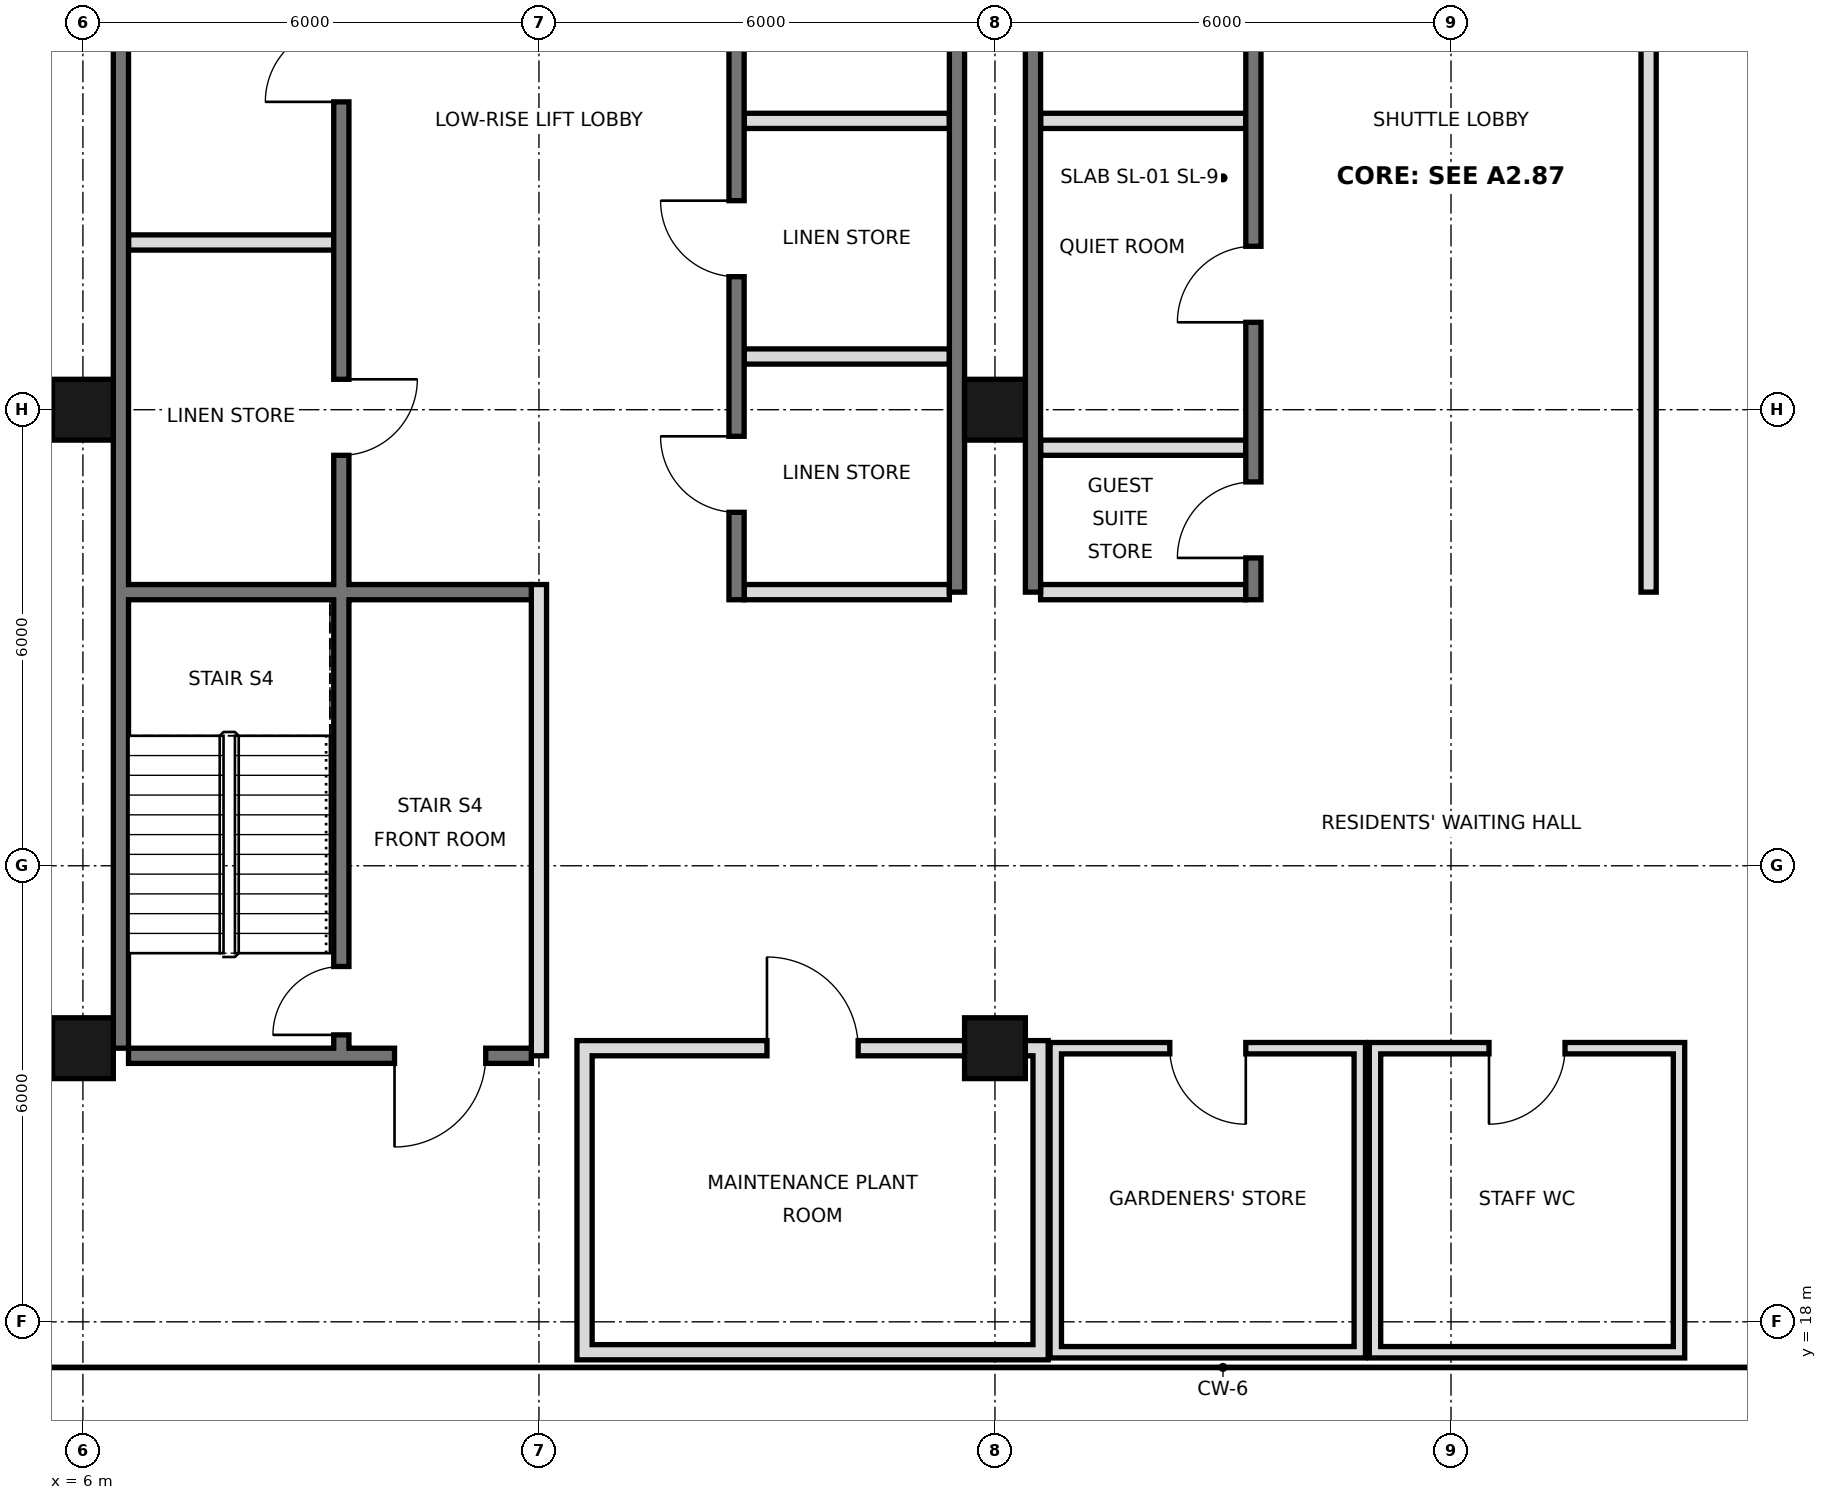
"""IFC4 building model, lengths in metres.
Left out: names, types, materials, properties, quantities, classifications, styles, units other than length and angle.
Written with IfcOpenShell. Run it as: python <this file> out.ifc"""

import sys

from ifc_helpers import new_model, si_unit, direction, frame, frame_2d, origin, origin_2d, place, context, subcontext, project, spatial, rectangle, hollow_rectangle, extrude, element, fill, save


model = new_model("IFC4")
c1 = context("Model", 3, precision=1e-05, world=origin(), true_north=direction((0.0, 1.0)))
c2 = subcontext(c1, "Body", "Model", "MODEL_VIEW")
j1 = project(units=[si_unit("LENGTHUNIT", "METRE"), si_unit("PLANEANGLEUNIT", "RADIAN")], contexts=[c1])
p1 = place(None, origin())
s1 = spatial("IfcSite", under=j1, at=p1, CompositionType="ELEMENT")
p2 = place(p1, origin())
s2 = spatial("IfcBuilding", under=s1, at=p2, CompositionType="ELEMENT")
p3 = place(p2, frame((0.0, 0.0, 349.8)))
s3 = spatial("IfcBuildingStorey", under=s2, at=p3, CompositionType="ELEMENT", Elevation=349.8)
for number, where, z_axis, x_axis in (
    (1, (6.0, 21.6, 0.0), (0.0, 0.0, 1.0), (1.0, 0.0, 0.0)),
    (2, (6.0, 30.0, 0.0), (0.0, 0.0, 1.0), (1.0, 0.0, 0.0)),
    (3, (18.0, 21.6, 0.0), (0.0, 0.0, 1.0), (1.0, 0.0, 0.0)),
    (4, (18.0, 30.0, 0.0), (0.0, 0.0, 1.0), (1.0, 0.0, 0.0)),
):
    element("IfcColumn", number, at=place(p3, frame(where, z_axis=z_axis, x_axis=x_axis)), inside=s3, PredefinedType="COLUMN", context=c2, shape_type="SweptSolid", body=[
        extrude(hollow_rectangle(XDim=0.8, YDim=0.8, WallThickness=0.025, at=origin_2d()), origin(), (0.0, 0.0, 1.0), 4.0),
    ])
p4 = place(p3, frame((12.6, 17.5, 0.0), z_axis=(0.0, 0.0, 1.0), x_axis=(0.0, 1.0, 0.0)))
e5 = element("IfcWall", 5, at=p4, inside=s3, PredefinedType="SOLIDWALL", context=c2, shape_type="SweptSolid", body=[
    extrude(rectangle(XDim=4.2, YDim=0.2, at=frame_2d((2.1, 0.0))), origin(), (0.0, 0.0, 1.0), 3.75),
])
p5 = place(p3, frame((18.6, 17.5, 0.0), z_axis=(0.0, 0.0, 1.0), x_axis=(0.0, 1.0, 0.0)))
e6 = element("IfcWall", 6, at=p5, inside=s3, PredefinedType="SOLIDWALL", context=c2, shape_type="SweptSolid", body=[
    extrude(rectangle(XDim=4.2, YDim=0.2, at=frame_2d((2.1, 0.0))), origin(), (0.0, 0.0, 1.0), 3.05),
])
for number, where, z_axis, x_axis in (
    (7, (18.8, 17.525, 0.0), (0.0, 0.0, 1.0), (0.0, 1.0, 0.0)),
    (8, (22.8, 17.525, 0.0), (0.0, 0.0, 1.0), (0.0, 1.0, 0.0)),
    (9, (23.0, 17.525, 0.0), (0.0, 0.0, 1.0), (0.0, 1.0, 0.0)),
    (10, (27.0, 17.525, 0.0), (0.0, 0.0, 1.0), (0.0, 1.0, 0.0)),
):
    element("IfcWall", number, at=place(p3, frame(where, z_axis=z_axis, x_axis=x_axis)), inside=s3, PredefinedType="PARTITIONING", context=c2, shape_type="SweptSolid", body=[
        extrude(rectangle(XDim=4.15, YDim=0.15, at=frame_2d((2.075, 0.0))), origin(), (0.0, 0.0, 1.0), 3.75),
    ])
p6 = place(p3, frame((12.7, 17.6, 0.0), z_axis=(0.0, 0.0, 1.0), x_axis=(1.0, 0.0, 0.0)))
e11 = element("IfcWall", 11, at=p6, inside=s3, PredefinedType="SOLIDWALL", context=c2, shape_type="SweptSolid", body=[
    extrude(rectangle(XDim=5.8, YDim=0.2, at=frame_2d((2.9, 0.0))), origin(), (0.0, 0.0, 1.0), 3.75),
])
for number, where, z_axis, x_axis in (
    (12, (18.875, 17.6, 0.0), (0.0, 0.0, 1.0), (1.0, 0.0, 0.0)),
    (13, (23.075, 17.6, 0.0), (0.0, 0.0, 1.0), (1.0, 0.0, 0.0)),
):
    element("IfcWall", number, at=place(p3, frame(where, z_axis=z_axis, x_axis=x_axis)), inside=s3, PredefinedType="PARTITIONING", context=c2, shape_type="SweptSolid", body=[
        extrude(rectangle(XDim=3.85, YDim=0.15, at=frame_2d((1.925, 0.0))), origin(), (0.0, 0.0, 1.0), 3.75),
    ])
p7 = place(p3, frame((12.7, 21.6, 0.0), z_axis=(0.0, 0.0, 1.0), x_axis=(1.0, 0.0, 0.0)))
e14 = element("IfcWall", 14, at=p7, inside=s3, PredefinedType="SOLIDWALL", context=c2, shape_type="SweptSolid", body=[
    extrude(rectangle(XDim=5.8, YDim=0.2, at=frame_2d((2.9, 0.0))), origin(), (0.0, 0.0, 1.0), 3.75),
])
p8 = place(p7, frame((2.3, 0.0, 0.0)))
e15 = element("IfcOpeningElement", 15, at=p8, cuts=e14, PredefinedType="OPENING", context=c2, shape_type="SweptSolid", body=[
    extrude(rectangle(XDim=1.2, YDim=2.4, at=frame_2d((0.6, 1.2))), frame((0.0, 0.11, 0.0), z_axis=(0.0, -1.0, 0.0), x_axis=(1.0, 0.0, 0.0)), (0.0, 0.0, 1.0), 0.22),
])
p9 = place(p3, frame((18.875, 21.6, 0.0), z_axis=(0.0, 0.0, 1.0), x_axis=(1.0, 0.0, 0.0)))
e16 = element("IfcWall", 16, at=p9, inside=s3, PredefinedType="PARTITIONING", context=c2, shape_type="SweptSolid", body=[
    extrude(rectangle(XDim=3.85, YDim=0.15, at=frame_2d((1.925, 0.0))), origin(), (0.0, 0.0, 1.0), 3.75),
])
p10 = place(p9, frame((1.425, 0.0, 0.0)))
e17 = element("IfcOpeningElement", 17, at=p10, cuts=e16, PredefinedType="OPENING", context=c2, shape_type="SweptSolid", body=[
    extrude(rectangle(XDim=1.0, YDim=2.4, at=frame_2d((0.5, 1.2))), frame((0.0, 0.085, 0.0), z_axis=(0.0, -1.0, 0.0), x_axis=(1.0, 0.0, 0.0)), (0.0, 0.0, 1.0), 0.17),
])
p11 = place(p3, frame((23.075, 21.6, 0.0), z_axis=(0.0, 0.0, 1.0), x_axis=(1.0, 0.0, 0.0)))
e18 = element("IfcWall", 18, at=p11, inside=s3, PredefinedType="PARTITIONING", context=c2, shape_type="SweptSolid", body=[
    extrude(rectangle(XDim=3.85, YDim=0.15, at=frame_2d((1.925, 0.0))), origin(), (0.0, 0.0, 1.0), 3.75),
])
p12 = place(p11, frame((1.425, 0.0, 0.0)))
e19 = element("IfcOpeningElement", 19, at=p12, cuts=e18, PredefinedType="OPENING", context=c2, shape_type="SweptSolid", body=[
    extrude(rectangle(XDim=1.0, YDim=2.4, at=frame_2d((0.5, 1.2))), frame((0.0, 0.085, 0.0), z_axis=(0.0, -1.0, 0.0), x_axis=(1.0, 0.0, 0.0)), (0.0, 0.0, 1.0), 0.17),
])
p13 = place(p3, frame((6.5, 21.6, 0.0), z_axis=(0.0, 0.0, 1.0), x_axis=(0.0, 1.0, 0.0)))
e20 = element("IfcWall", 20, at=p13, inside=s3, PredefinedType="SOLIDWALL", context=c2, shape_type="SweptSolid", body=[
    extrude(rectangle(XDim=23.5, YDim=0.2, at=frame_2d((11.75, 0.0))), origin(), (0.0, 0.0, 1.0), 3.75),
])
for number, where, z_axis, x_axis in (
    (21, (17.5, 27.6, 0.0), (0.0, 0.0, 1.0), (0.0, 1.0, 0.0)),
    (22, (18.5, 27.6, 0.0), (0.0, 0.0, 1.0), (0.0, 1.0, 0.0)),
):
    element("IfcWall", number, at=place(p3, frame(where, z_axis=z_axis, x_axis=x_axis)), inside=s3, PredefinedType="SOLIDWALL", context=c2, shape_type="SweptSolid", body=[
        extrude(rectangle(XDim=17.5, YDim=0.2, at=frame_2d((8.75, 0.0))), origin(), (0.0, 0.0, 1.0), 3.75),
    ])
p14 = place(p3, frame((12.0, 21.5, 0.0), z_axis=(0.0, 0.0, 1.0), x_axis=(0.0, 1.0, 0.0)))
e23 = element("IfcWall", 23, at=p14, inside=s3, PredefinedType="PARTITIONING", context=c2, shape_type="SweptSolid", body=[
    extrude(rectangle(XDim=6.2, YDim=0.2, at=frame_2d((3.1, 0.0))), origin(), (0.0, 0.0, 1.0), 3.75),
])
p15 = place(p3, frame((14.6, 27.5, 0.0), z_axis=(0.0, 0.0, 1.0), x_axis=(0.0, 1.0, 0.0)))
e24 = element("IfcWall", 24, at=p15, inside=s3, PredefinedType="SOLIDWALL", context=c2, shape_type="SweptSolid", body=[
    extrude(rectangle(XDim=17.5, YDim=0.2, at=frame_2d((8.75, 0.0))), origin(), (0.0, 0.0, 1.0), 3.75),
])
p16 = place(p15, frame((15.4, 0.0, 0.0)))
e25 = element("IfcOpeningElement", 25, at=p16, cuts=e24, PredefinedType="OPENING", context=c2, shape_type="SweptSolid", body=[
    extrude(rectangle(XDim=1.1, YDim=2.1, at=frame_2d((0.55, 1.05))), frame((0.0, 0.11, 0.0), z_axis=(0.0, -1.0, 0.0), x_axis=(1.0, 0.0, 0.0)), (0.0, 0.0, 1.0), 0.22),
])
p17 = place(p15, frame((1.15, 0.0, 0.0)))
e26 = element("IfcOpeningElement", 26, at=p17, cuts=e24, PredefinedType="OPENING", context=c2, shape_type="SweptSolid", body=[
    extrude(rectangle(XDim=1.0, YDim=2.1, at=frame_2d((0.5, 1.05))), frame((0.0, 0.11, 0.0), z_axis=(0.0, -1.0, 0.0), x_axis=(1.0, 0.0, 0.0)), (0.0, 0.0, 1.0), 0.22),
])
p18 = place(p15, frame((4.25, 0.0, 0.0)))
e27 = element("IfcOpeningElement", 27, at=p18, cuts=e24, PredefinedType="OPENING", context=c2, shape_type="SweptSolid", body=[
    extrude(rectangle(XDim=1.0, YDim=2.1, at=frame_2d((0.5, 1.05))), frame((0.0, 0.11, 0.0), z_axis=(0.0, -1.0, 0.0), x_axis=(1.0, 0.0, 0.0)), (0.0, 0.0, 1.0), 0.22),
])
p19 = place(p3, frame((21.4, 27.5, 0.0), z_axis=(0.0, 0.0, 1.0), x_axis=(0.0, 1.0, 0.0)))
e28 = element("IfcWall", 28, at=p19, inside=s3, PredefinedType="SOLIDWALL", context=c2, shape_type="SweptSolid", body=[
    extrude(rectangle(XDim=17.5, YDim=0.2, at=frame_2d((8.75, 0.0))), origin(), (0.0, 0.0, 1.0), 3.75),
])
p20 = place(p19, frame((0.55, 0.0, 0.0)))
e29 = element("IfcOpeningElement", 29, at=p20, cuts=e28, PredefinedType="OPENING", context=c2, shape_type="SweptSolid", body=[
    extrude(rectangle(XDim=1.0, YDim=2.1, at=frame_2d((0.5, 1.05))), frame((0.0, 0.11, 0.0), z_axis=(0.0, -1.0, 0.0), x_axis=(1.0, 0.0, 0.0)), (0.0, 0.0, 1.0), 0.22),
])
p21 = place(p19, frame((3.65, 0.0, 0.0)))
e30 = element("IfcOpeningElement", 30, at=p21, cuts=e28, PredefinedType="OPENING", context=c2, shape_type="SweptSolid", body=[
    extrude(rectangle(XDim=1.0, YDim=2.1, at=frame_2d((0.5, 1.05))), frame((0.0, 0.11, 0.0), z_axis=(0.0, -1.0, 0.0), x_axis=(1.0, 0.0, 0.0)), (0.0, 0.0, 1.0), 0.22),
])
p22 = place(p19, frame((9.8, 0.0, 0.0)))
e31 = element("IfcOpeningElement", 31, at=p22, cuts=e28, PredefinedType="OPENING", context=c2, shape_type="SweptSolid", body=[
    extrude(rectangle(XDim=1.0, YDim=2.1, at=frame_2d((0.5, 1.05))), frame((0.0, 0.11, 0.0), z_axis=(0.0, -1.0, 0.0), x_axis=(1.0, 0.0, 0.0)), (0.0, 0.0, 1.0), 0.22),
])
p23 = place(p3, frame((26.6, 27.6, 0.0), z_axis=(0.0, 0.0, 1.0), x_axis=(0.0, 1.0, 0.0)))
e32 = element("IfcWall", 32, at=p23, inside=s3, PredefinedType="PARTITIONING", context=c2, shape_type="SweptSolid", body=[
    extrude(rectangle(XDim=17.4, YDim=0.2, at=frame_2d((8.7, 0.0))), origin(), (0.0, 0.0, 1.0), 3.75),
])
p24 = place(p23, frame((10.25, 0.0, 0.0)))
e33 = element("IfcOpeningElement", 33, at=p24, cuts=e32, PredefinedType="OPENING", context=c2, shape_type="SweptSolid", body=[
    extrude(rectangle(XDim=1.0, YDim=2.1, at=frame_2d((0.5, 1.05))), frame((0.0, 0.11, 0.0), z_axis=(0.0, -1.0, 0.0), x_axis=(1.0, 0.0, 0.0)), (0.0, 0.0, 1.0), 0.22),
])
p25 = place(p3, frame((9.4, 21.5, 0.0), z_axis=(0.0, 0.0, 1.0), x_axis=(0.0, 1.0, 0.0)))
e34 = element("IfcWall", 34, at=p25, inside=s3, PredefinedType="SOLIDWALL", context=c2, shape_type="SweptSolid", body=[
    extrude(rectangle(XDim=23.5, YDim=0.2, at=frame_2d((11.75, 0.0))), origin(), (0.0, 0.0, 1.0), 3.75),
])
p26 = place(p25, frame((7.9, 0.0, 0.0)))
e35 = element("IfcOpeningElement", 35, at=p26, cuts=e34, PredefinedType="OPENING", context=c2, shape_type="SweptSolid", body=[
    extrude(rectangle(XDim=1.0, YDim=2.1, at=frame_2d((0.5, 1.05))), frame((0.0, 0.11, 0.0), z_axis=(0.0, -1.0, 0.0), x_axis=(1.0, 0.0, 0.0)), (0.0, 0.0, 1.0), 0.22),
])
p27 = place(p25, frame((12.55, 0.0, 0.0)))
e36 = element("IfcOpeningElement", 36, at=p27, cuts=e34, PredefinedType="OPENING", context=c2, shape_type="SweptSolid", body=[
    extrude(rectangle(XDim=1.0, YDim=2.1, at=frame_2d((0.5, 1.05))), frame((0.0, 0.11, 0.0), z_axis=(0.0, -1.0, 0.0), x_axis=(1.0, 0.0, 0.0)), (0.0, 0.0, 1.0), 0.22),
])
p28 = place(p25, frame((15.8, 0.0, 0.0)))
e37 = element("IfcOpeningElement", 37, at=p28, cuts=e34, PredefinedType="OPENING", context=c2, shape_type="SweptSolid", body=[
    extrude(rectangle(XDim=1.0, YDim=2.1, at=frame_2d((0.5, 1.05))), frame((0.0, 0.11, 0.0), z_axis=(0.0, -1.0, 0.0), x_axis=(1.0, 0.0, 0.0)), (0.0, 0.0, 1.0), 0.22),
])
p29 = place(p25, frame((0.275, 0.0, 0.0)))
e38 = element("IfcOpeningElement", 38, at=p29, cuts=e34, PredefinedType="OPENING", context=c2, shape_type="SweptSolid", body=[
    extrude(rectangle(XDim=0.9, YDim=2.1, at=frame_2d((0.45, 1.05))), frame((0.0, 0.11, 0.0), z_axis=(0.0, -1.0, 0.0), x_axis=(1.0, 0.0, 0.0)), (0.0, 0.0, 1.0), 0.22),
])
p30 = place(p3, frame((6.6, 21.5, 0.0), z_axis=(0.0, 0.0, 1.0), x_axis=(1.0, 0.0, 0.0)))
e39 = element("IfcWall", 39, at=p30, inside=s3, PredefinedType="SOLIDWALL", context=c2, shape_type="SweptSolid", body=[
    extrude(rectangle(XDim=5.3, YDim=0.2, at=frame_2d((2.65, 0.0))), origin(), (0.0, 0.0, 1.0), 3.75),
])
p31 = place(p30, frame((3.5, 0.0, 0.0)))
e40 = element("IfcOpeningElement", 40, at=p31, cuts=e39, PredefinedType="OPENING", context=c2, shape_type="SweptSolid", body=[
    extrude(rectangle(XDim=1.2, YDim=2.1, at=frame_2d((0.6, 1.05))), frame((0.0, 0.11, 0.0), z_axis=(0.0, -1.0, 0.0), x_axis=(1.0, 0.0, 0.0)), (0.0, 0.0, 1.0), 0.22),
])
for number, where, z_axis, x_axis in (
    (41, (14.7, 27.6, 0.0), (0.0, 0.0, 1.0), (1.0, 0.0, 0.0)),
    (42, (18.6, 27.6, 0.0), (0.0, 0.0, 1.0), (1.0, 0.0, 0.0)),
):
    element("IfcWall", number, at=place(p3, frame(where, z_axis=z_axis, x_axis=x_axis)), inside=s3, PredefinedType="PARTITIONING", context=c2, shape_type="SweptSolid", body=[
        extrude(rectangle(XDim=2.7, YDim=0.2, at=frame_2d((1.35, 0.0))), origin(), (0.0, 0.0, 1.0), 3.75),
    ])
p32 = place(p3, frame((6.6, 27.6, 0.0), z_axis=(0.0, 0.0, 1.0), x_axis=(1.0, 0.0, 0.0)))
e43 = element("IfcWall", 43, at=p32, inside=s3, PredefinedType="SOLIDWALL", context=c2, shape_type="SweptSolid", body=[
    extrude(rectangle(XDim=5.3, YDim=0.2, at=frame_2d((2.65, 0.0))), origin(), (0.0, 0.0, 1.0), 3.75),
])
for number, where, z_axis, x_axis in (
    (44, (18.6, 29.5, 0.0), (0.0, 0.0, 1.0), (1.0, 0.0, 0.0)),
    (45, (14.7, 30.7, 0.0), (0.0, 0.0, 1.0), (1.0, 0.0, 0.0)),
    (46, (6.6, 32.2, 0.0), (0.0, 0.0, 1.0), (1.0, 0.0, 0.0)),
    (47, (14.7, 33.8, 0.0), (0.0, 0.0, 1.0), (1.0, 0.0, 0.0)),
    (48, (18.6, 33.8, 0.0), (0.0, 0.0, 1.0), (1.0, 0.0, 0.0)),
):
    element("IfcWall", number, at=place(p3, frame(where, z_axis=z_axis, x_axis=x_axis)), inside=s3, PredefinedType="PARTITIONING", context=c2, shape_type="SweptSolid", body=[
        extrude(rectangle(XDim=2.7, YDim=0.2, at=frame_2d((1.35, 0.0))), origin(), (0.0, 0.0, 1.0), 3.75),
    ])
p33 = place(p8, origin())
e49 = element("IfcDoor", 49, at=p33, inside=s3, OperationType="SINGLE_SWING_LEFT", PredefinedType="DOOR", context=c2, shape_type="SweptSolid", body=[
    extrude(rectangle(XDim=1.2, YDim=2.4, at=frame_2d((0.6, 1.2))), frame((0.0, 0.025, 0.0), z_axis=(0.0, -1.0, 0.0), x_axis=(1.0, 0.0, 0.0)), (0.0, 0.0, 1.0), 0.05),
])
fill(e15, e49)
p34 = place(p10, origin())
e50 = element("IfcDoor", 50, at=p34, inside=s3, OperationType="SINGLE_SWING_RIGHT", PredefinedType="DOOR", context=c2, shape_type="SweptSolid", body=[
    extrude(rectangle(XDim=1.0, YDim=2.4, at=frame_2d((0.5, 1.2))), frame((0.0, 0.025, 0.0), z_axis=(0.0, -1.0, 0.0), x_axis=(1.0, 0.0, 0.0)), (0.0, 0.0, 1.0), 0.05),
])
fill(e17, e50)
p35 = place(p12, frame((1.0, 0.0, 0.0), z_axis=(0.0, 0.0, 1.0), x_axis=(-1.0, 0.0, 0.0)))
e51 = element("IfcDoor", 51, at=p35, inside=s3, OperationType="SINGLE_SWING_RIGHT", PredefinedType="DOOR", context=c2, shape_type="SweptSolid", body=[
    extrude(rectangle(XDim=1.0, YDim=2.4, at=frame_2d((0.5, 1.2))), frame((0.0, 0.025, 0.0), z_axis=(0.0, -1.0, 0.0), x_axis=(1.0, 0.0, 0.0)), (0.0, 0.0, 1.0), 0.05),
])
fill(e19, e51)
p36 = place(p31, frame((1.2, 0.0, 0.0), z_axis=(0.0, 0.0, 1.0), x_axis=(-1.0, 0.0, 0.0)))
e52 = element("IfcDoor", 52, at=p36, inside=s3, OperationType="SINGLE_SWING_RIGHT", PredefinedType="DOOR", context=c2, shape_type="SweptSolid", body=[
    extrude(rectangle(XDim=1.2, YDim=2.1, at=frame_2d((0.6, 1.05))), frame((0.0, 0.025, 0.0), z_axis=(0.0, -1.0, 0.0), x_axis=(1.0, 0.0, 0.0)), (0.0, 0.0, 1.0), 0.05),
])
fill(e40, e52)
p37 = place(p20, origin())
e53 = element("IfcDoor", 53, at=p37, inside=s3, OperationType="SINGLE_SWING_LEFT", PredefinedType="DOOR", context=c2, shape_type="SweptSolid", body=[
    extrude(rectangle(XDim=1.0, YDim=2.1, at=frame_2d((0.5, 1.05))), frame((0.0, 0.025, 0.0), z_axis=(0.0, -1.0, 0.0), x_axis=(1.0, 0.0, 0.0)), (0.0, 0.0, 1.0), 0.05),
])
fill(e29, e53)
p38 = place(p21, origin())
e54 = element("IfcDoor", 54, at=p38, inside=s3, OperationType="SINGLE_SWING_LEFT", PredefinedType="DOOR", context=c2, shape_type="SweptSolid", body=[
    extrude(rectangle(XDim=1.0, YDim=2.1, at=frame_2d((0.5, 1.05))), frame((0.0, 0.025, 0.0), z_axis=(0.0, -1.0, 0.0), x_axis=(1.0, 0.0, 0.0)), (0.0, 0.0, 1.0), 0.05),
])
fill(e30, e54)
p39 = place(p17, frame((1.0, 0.0, 0.0), z_axis=(0.0, 0.0, 1.0), x_axis=(-1.0, 0.0, 0.0)))
e55 = element("IfcDoor", 55, at=p39, inside=s3, OperationType="SINGLE_SWING_LEFT", PredefinedType="DOOR", context=c2, shape_type="SweptSolid", body=[
    extrude(rectangle(XDim=1.0, YDim=2.1, at=frame_2d((0.5, 1.05))), frame((0.0, 0.025, 0.0), z_axis=(0.0, -1.0, 0.0), x_axis=(1.0, 0.0, 0.0)), (0.0, 0.0, 1.0), 0.05),
])
fill(e26, e55)
p40 = place(p18, frame((1.0, 0.0, 0.0), z_axis=(0.0, 0.0, 1.0), x_axis=(-1.0, 0.0, 0.0)))
e56 = element("IfcDoor", 56, at=p40, inside=s3, OperationType="SINGLE_SWING_LEFT", PredefinedType="DOOR", context=c2, shape_type="SweptSolid", body=[
    extrude(rectangle(XDim=1.0, YDim=2.1, at=frame_2d((0.5, 1.05))), frame((0.0, 0.025, 0.0), z_axis=(0.0, -1.0, 0.0), x_axis=(1.0, 0.0, 0.0)), (0.0, 0.0, 1.0), 0.05),
])
fill(e27, e56)
p41 = place(p26, origin())
e57 = element("IfcDoor", 57, at=p41, inside=s3, OperationType="SINGLE_SWING_RIGHT", PredefinedType="DOOR", context=c2, shape_type="SweptSolid", body=[
    extrude(rectangle(XDim=1.0, YDim=2.1, at=frame_2d((0.5, 1.05))), frame((0.0, 0.025, 0.0), z_axis=(0.0, -1.0, 0.0), x_axis=(1.0, 0.0, 0.0)), (0.0, 0.0, 1.0), 0.05),
])
fill(e35, e57)
p42 = place(p27, origin())
e58 = element("IfcDoor", 58, at=p42, inside=s3, OperationType="SINGLE_SWING_LEFT", PredefinedType="DOOR", context=c2, shape_type="SweptSolid", body=[
    extrude(rectangle(XDim=1.0, YDim=2.1, at=frame_2d((0.5, 1.05))), frame((0.0, 0.025, 0.0), z_axis=(0.0, -1.0, 0.0), x_axis=(1.0, 0.0, 0.0)), (0.0, 0.0, 1.0), 0.05),
])
fill(e36, e58)
p43 = place(p29, origin())
e59 = element("IfcDoor", 59, at=p43, inside=s3, OperationType="SINGLE_SWING_LEFT", PredefinedType="DOOR", context=c2, shape_type="SweptSolid", body=[
    extrude(rectangle(XDim=0.9, YDim=2.1, at=frame_2d((0.45, 1.05))), frame((0.0, 0.025, 0.0), z_axis=(0.0, -1.0, 0.0), x_axis=(1.0, 0.0, 0.0)), (0.0, 0.0, 1.0), 0.05),
])
fill(e38, e59)
save(model, sys.argv[1])
